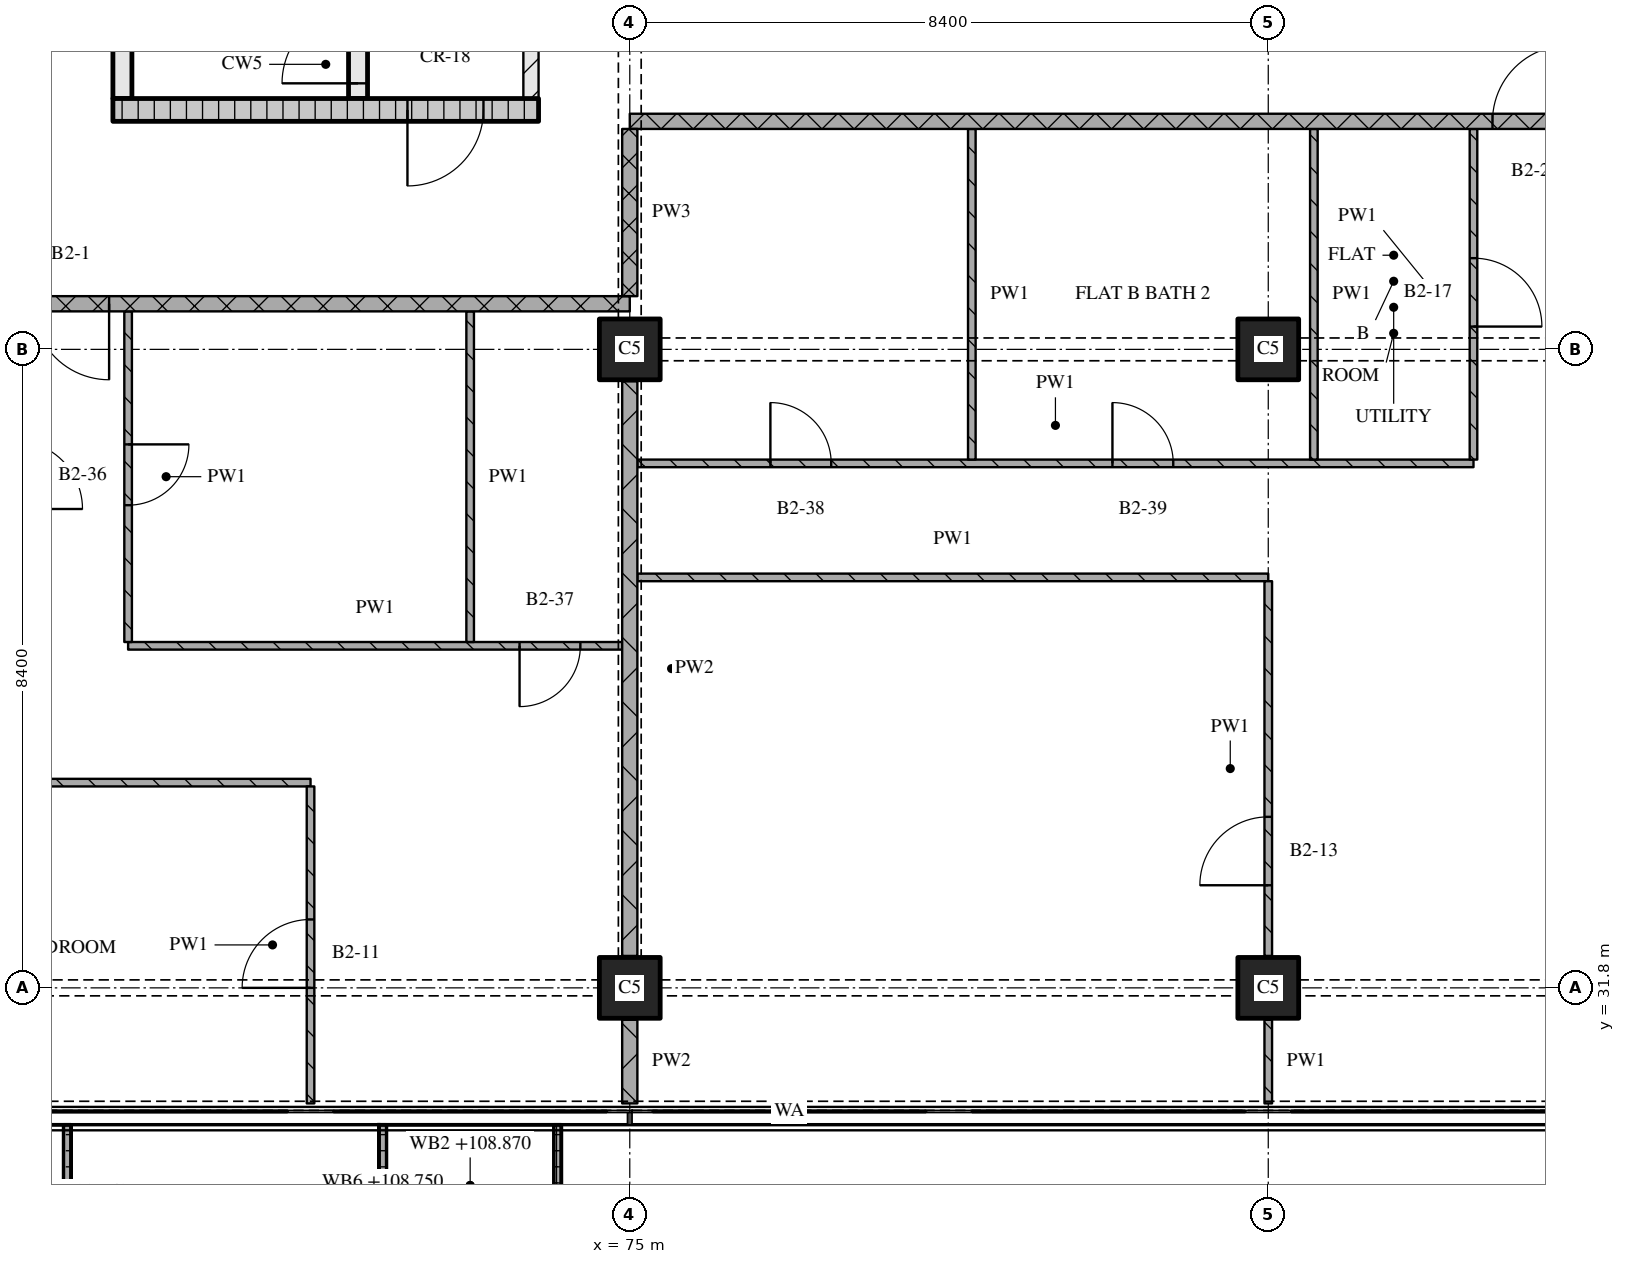
"""IFC4 building model, lengths in metres.
Left out: names, types, materials, properties, quantities, classifications, styles, units other than length and angle.
Written with IfcOpenShell. Run it as: python <this file> out.ifc"""

import sys

from ifc_helpers import new_model, si_unit, direction, frame, frame_2d, origin, origin_2d, place, context, subcontext, project, spatial, polyline, rectangle, outline, extrude, element, fill, save


model = new_model("IFC4")
c1 = context("Model", 3, precision=1e-05, world=origin(), true_north=direction((0.0, 1.0)))
c2 = subcontext(c1, "Body", "Model", "MODEL_VIEW")
j1 = project(units=[si_unit("LENGTHUNIT", "METRE"), si_unit("PLANEANGLEUNIT", "RADIAN")], contexts=[c1])
p1 = place(None, origin())
s1 = spatial("IfcSite", under=j1, at=p1, CompositionType="ELEMENT")
p2 = place(p1, origin())
s2 = spatial("IfcBuilding", under=s1, at=p2, CompositionType="ELEMENT")
p3 = place(p2, frame((0.0, 0.0, 106.05)))
s3 = spatial("IfcBuildingStorey", under=s2, at=p3, CompositionType="ELEMENT", Elevation=106.05)
for number, where, z_axis, x_axis in (
    (1, (75.0, 31.8, 0.0), (0.0, 0.0, 1.0), (1.0, 0.0, 0.0)),
    (2, (75.0, 40.2, 0.0), (0.0, 0.0, 1.0), (1.0, 0.0, 0.0)),
    (3, (83.4, 31.8, 0.0), (0.0, 0.0, 1.0), (1.0, 0.0, 0.0)),
    (4, (83.4, 40.2, 0.0), (0.0, 0.0, 1.0), (1.0, 0.0, 0.0)),
):
    element("IfcColumn", number, at=place(p3, frame(where, z_axis=z_axis, x_axis=x_axis)), inside=s3, PredefinedType="COLUMN", context=c2, shape_type="SweptSolid", body=[
        extrude(rectangle(XDim=0.8, YDim=0.8, at=origin_2d()), origin(), (0.0, 0.0, 1.0), 3.6),
    ])
p4 = place(p3, origin())
e5 = element("IfcWall", 5, at=p4, inside=s3, PredefinedType="SOLIDWALL", context=c2, shape_type="SweptSolid", body=[
    extrude(outline(polyline([(61.35, 30.0), (61.45, 30.0), (61.45, 28.233), (67.55, 28.233), (67.55, 30.0), (67.65, 30.0), (67.65, 28.133), (61.35, 28.133), (61.35, 30.0)])), origin(), (0.0, 0.0, 1.0), 1.0),
])
p5 = place(p3, origin())
e6 = element("IfcWall", 6, at=p5, inside=s3, PredefinedType="SOLIDWALL", context=c2, shape_type="SweptSolid", body=[
    extrude(outline(polyline([(71.7, 30.0), (71.8, 30.0), (71.8, 28.5), (74.0, 28.5), (74.0, 30.0), (74.1, 30.0), (74.1, 28.4), (71.7, 28.4), (71.7, 30.0)])), origin(), (0.0, 0.0, 1.0), 1.0),
])
p6 = place(p3, frame((68.2, 43.35, 0.0), z_axis=(0.0, 0.0, 1.0), x_axis=(1.0, 0.0, 0.0)))
e7 = element("IfcWall", 7, at=p6, inside=s3, PredefinedType="SOLIDWALL", context=c2, shape_type="SweptSolid", body=[
    extrude(rectangle(XDim=5.6, YDim=0.3, at=frame_2d((2.8, 0.0))), origin(), (0.0, 0.0, 1.0), 3.32),
])
p7 = place(p6, frame((3.875, 0.0, 0.0)))
e8 = element("IfcOpeningElement", 8, at=p7, cuts=e7, PredefinedType="OPENING", context=c2, shape_type="SweptSolid", body=[
    extrude(rectangle(XDim=1.0, YDim=2.1, at=frame_2d((0.5, 1.05))), frame((0.0, 0.16, 0.0), z_axis=(0.0, -1.0, 0.0), x_axis=(1.0, 0.0, 0.0)), (0.0, 0.0, 1.0), 0.32),
])
p8 = place(p3, frame((68.325, 43.5, 0.0), z_axis=(0.0, 0.0, 1.0), x_axis=(0.0, 1.0, 0.0)))
e9 = element("IfcWall", 9, at=p8, inside=s3, PredefinedType="SOLIDWALL", context=c2, shape_type="SweptSolid", body=[
    extrude(rectangle(XDim=6.9, YDim=0.25, at=frame_2d((3.45, 0.0))), origin(), (0.0, 0.0, 1.0), 3.32),
])
p9 = place(p3, frame((71.425, 43.5, 0.0), z_axis=(0.0, 0.0, 1.0), x_axis=(0.0, 1.0, 0.0)))
e10 = element("IfcWall", 10, at=p9, inside=s3, PredefinedType="SOLIDWALL", context=c2, shape_type="SweptSolid", body=[
    extrude(rectangle(XDim=6.9, YDim=0.25, at=frame_2d((3.45, 0.0))), origin(), (0.0, 0.0, 1.0), 3.32),
])
p10 = place(p9, frame((0.2, 0.0, 0.0)))
e11 = element("IfcOpeningElement", 11, at=p10, cuts=e10, PredefinedType="OPENING", context=c2, shape_type="SweptSolid", body=[
    extrude(rectangle(XDim=1.0, YDim=2.1, at=frame_2d((0.5, 1.05))), frame((0.0, 0.135, 0.0), z_axis=(0.0, -1.0, 0.0), x_axis=(1.0, 0.0, 0.0)), (0.0, 0.0, 1.0), 0.27),
])
p11 = place(p3, frame((73.7, 43.5, 0.0), z_axis=(0.0, 0.0, 1.0), x_axis=(0.0, 1.0, 0.0)))
e12 = element("IfcWall", 12, at=p11, inside=s3, PredefinedType="PARTITIONING", context=c2, shape_type="SweptSolid", body=[
    extrude(rectangle(XDim=6.9, YDim=0.2, at=frame_2d((3.45, 0.0))), origin(), (0.0, 0.0, 1.0), 3.32),
])
p12 = place(p11, frame((1.0, 0.0, 0.0)))
e13 = element("IfcOpeningElement", 13, at=p12, cuts=e12, PredefinedType="OPENING", context=c2, shape_type="SweptSolid", body=[
    extrude(rectangle(XDim=1.0, YDim=2.1, at=frame_2d((0.5, 1.05))), frame((0.0, 0.11, 0.0), z_axis=(0.0, -1.0, 0.0), x_axis=(1.0, 0.0, 0.0)), (0.0, 0.0, 1.0), 0.22),
])
p13 = place(p3, frame((70.8, 34.5, 0.0), z_axis=(0.0, 0.0, 1.0), x_axis=(-1.0, 0.0, 0.0)))
e14 = element("IfcWall", 14, at=p13, inside=s3, PredefinedType="PARTITIONING", context=c2, shape_type="SweptSolid", body=[
    extrude(rectangle(XDim=22.52, YDim=0.1, at=frame_2d((11.26, 0.0))), origin(), (0.0, 0.0, 1.0), 3.32),
])
p14 = place(p13, frame((10.05, 0.0, 0.0)))
e15 = element("IfcOpeningElement", 15, at=p14, cuts=e14, PredefinedType="OPENING", context=c2, shape_type="SweptSolid", body=[
    extrude(rectangle(XDim=0.9, YDim=2.1, at=frame_2d((0.45, 1.05))), frame((0.0, 0.06, 0.0), z_axis=(0.0, -1.0, 0.0), x_axis=(1.0, 0.0, 0.0)), (0.0, 0.0, 1.0), 0.12),
])
p15 = place(p13, frame((14.25, 0.0, 0.0)))
e16 = element("IfcOpeningElement", 16, at=p15, cuts=e14, PredefinedType="OPENING", context=c2, shape_type="SweptSolid", body=[
    extrude(rectangle(XDim=0.9, YDim=2.1, at=frame_2d((0.45, 1.05))), frame((0.0, 0.06, 0.0), z_axis=(0.0, -1.0, 0.0), x_axis=(1.0, 0.0, 0.0)), (0.0, 0.0, 1.0), 0.12),
])
p16 = place(p13, frame((17.654, 0.0, 0.0)))
e17 = element("IfcOpeningElement", 17, at=p16, cuts=e14, PredefinedType="OPENING", context=c2, shape_type="SweptSolid", body=[
    extrude(rectangle(XDim=0.9, YDim=2.1, at=frame_2d((0.45, 1.05))), frame((0.0, 0.06, 0.0), z_axis=(0.0, -1.0, 0.0), x_axis=(1.0, 0.0, 0.0)), (0.0, 0.0, 1.0), 0.12),
])
p17 = place(p3, frame((68.4, 36.3, 0.0), z_axis=(0.0, 0.0, 1.0), x_axis=(1.0, 0.0, 0.0)))
e18 = element("IfcWall", 18, at=p17, inside=s3, PredefinedType="PARTITIONING", context=c2, shape_type="SweptSolid", body=[
    extrude(rectangle(XDim=6.5, YDim=0.1, at=frame_2d((3.25, 0.0))), origin(), (0.0, 0.0, 1.0), 3.32),
])
p18 = place(p17, frame((5.15, 0.0, 0.0)))
e19 = element("IfcOpeningElement", 19, at=p18, cuts=e18, PredefinedType="OPENING", context=c2, shape_type="SweptSolid", body=[
    extrude(rectangle(XDim=0.8, YDim=2.1, at=frame_2d((0.4, 1.05))), frame((0.0, 0.06, 0.0), z_axis=(0.0, -1.0, 0.0), x_axis=(1.0, 0.0, 0.0)), (0.0, 0.0, 1.0), 0.12),
])
p19 = place(p3, frame((75.1, 37.2, 0.0), z_axis=(0.0, 0.0, 1.0), x_axis=(1.0, 0.0, 0.0)))
e20 = element("IfcWall", 20, at=p19, inside=s3, PredefinedType="PARTITIONING", context=c2, shape_type="SweptSolid", body=[
    extrude(rectangle(XDim=8.3, YDim=0.1, at=frame_2d((4.15, 0.0))), origin(), (0.0, 0.0, 1.0), 3.32),
])
p20 = place(p3, frame((75.1, 38.7, 0.0), z_axis=(0.0, 0.0, 1.0), x_axis=(1.0, 0.0, 0.0)))
e21 = element("IfcWall", 21, at=p20, inside=s3, PredefinedType="PARTITIONING", context=c2, shape_type="SweptSolid", body=[
    extrude(rectangle(XDim=11.0, YDim=0.1, at=frame_2d((5.5, 0.0))), origin(), (0.0, 0.0, 1.0), 3.32),
])
p21 = place(p20, frame((1.75, 0.0, 0.0)))
e22 = element("IfcOpeningElement", 22, at=p21, cuts=e21, PredefinedType="OPENING", context=c2, shape_type="SweptSolid", body=[
    extrude(rectangle(XDim=0.8, YDim=2.1, at=frame_2d((0.4, 1.05))), frame((0.0, 0.06, 0.0), z_axis=(0.0, -1.0, 0.0), x_axis=(1.0, 0.0, 0.0)), (0.0, 0.0, 1.0), 0.12),
])
p22 = place(p20, frame((6.25, 0.0, 0.0)))
e23 = element("IfcOpeningElement", 23, at=p22, cuts=e21, PredefinedType="OPENING", context=c2, shape_type="SweptSolid", body=[
    extrude(rectangle(XDim=0.8, YDim=2.1, at=frame_2d((0.4, 1.05))), frame((0.0, 0.06, 0.0), z_axis=(0.0, -1.0, 0.0), x_axis=(1.0, 0.0, 0.0)), (0.0, 0.0, 1.0), 0.12),
])
p23 = place(p3, frame((75.0, 40.8, 0.0), z_axis=(0.0, 0.0, 1.0), x_axis=(-1.0, 0.0, 0.0)))
e24 = element("IfcWall", 24, at=p23, inside=s3, PredefinedType="PARTITIONING", context=c2, shape_type="SweptSolid", body=[
    extrude(rectangle(XDim=24.18, YDim=0.2, at=frame_2d((12.09, 0.0))), origin(), (0.0, 0.0, 1.0), 3.32),
])
p24 = place(p23, frame((6.85, 0.0, 0.0)))
e25 = element("IfcOpeningElement", 25, at=p24, cuts=e24, PredefinedType="OPENING", context=c2, shape_type="SweptSolid", body=[
    extrude(rectangle(XDim=1.0, YDim=2.1, at=frame_2d((0.5, 1.05))), frame((0.0, 0.11, 0.0), z_axis=(0.0, -1.0, 0.0), x_axis=(1.0, 0.0, 0.0)), (0.0, 0.0, 1.0), 0.22),
])
p25 = place(p3, frame((100.2, 43.2, 0.0), z_axis=(0.0, 0.0, 1.0), x_axis=(-1.0, 0.0, 0.0)))
e26 = element("IfcWall", 26, at=p25, inside=s3, PredefinedType="PARTITIONING", context=c2, shape_type="SweptSolid", body=[
    extrude(rectangle(XDim=25.2, YDim=0.2, at=frame_2d((12.6, 0.0))), origin(), (0.0, 0.0, 1.0), 3.32),
])
p26 = place(p25, frame((12.85, 0.0, 0.0)))
e27 = element("IfcOpeningElement", 27, at=p26, cuts=e26, PredefinedType="OPENING", context=c2, shape_type="SweptSolid", body=[
    extrude(rectangle(XDim=1.0, YDim=2.1, at=frame_2d((0.5, 1.05))), frame((0.0, 0.11, 0.0), z_axis=(0.0, -1.0, 0.0), x_axis=(1.0, 0.0, 0.0)), (0.0, 0.0, 1.0), 0.22),
])
p27 = place(p3, frame((68.4, 40.7, 0.0), z_axis=(0.0, 0.0, 1.0), x_axis=(0.0, -1.0, 0.0)))
e28 = element("IfcWall", 28, at=p27, inside=s3, PredefinedType="PARTITIONING", context=c2, shape_type="SweptSolid", body=[
    extrude(rectangle(XDim=4.35, YDim=0.1, at=frame_2d((2.175, 0.0))), origin(), (0.0, 0.0, 1.0), 3.32),
])
p28 = place(p27, frame((1.75, 0.0, 0.0)))
e29 = element("IfcOpeningElement", 29, at=p28, cuts=e28, PredefinedType="OPENING", context=c2, shape_type="SweptSolid", body=[
    extrude(rectangle(XDim=0.8, YDim=2.1, at=frame_2d((0.4, 1.05))), frame((0.0, 0.06, 0.0), z_axis=(0.0, -1.0, 0.0), x_axis=(1.0, 0.0, 0.0)), (0.0, 0.0, 1.0), 0.12),
])
p29 = place(p3, frame((70.8, 30.28, 0.0), z_axis=(0.0, 0.0, 1.0), x_axis=(0.0, 1.0, 0.0)))
e30 = element("IfcWall", 30, at=p29, inside=s3, PredefinedType="PARTITIONING", context=c2, shape_type="SweptSolid", body=[
    extrude(rectangle(XDim=4.17, YDim=0.1, at=frame_2d((2.085, 0.0))), origin(), (0.0, 0.0, 1.0), 3.32),
])
p30 = place(p29, frame((1.52, 0.0, 0.0)))
e31 = element("IfcOpeningElement", 31, at=p30, cuts=e30, PredefinedType="OPENING", context=c2, shape_type="SweptSolid", body=[
    extrude(rectangle(XDim=0.9, YDim=2.1, at=frame_2d((0.45, 1.05))), frame((0.0, 0.06, 0.0), z_axis=(0.0, -1.0, 0.0), x_axis=(1.0, 0.0, 0.0)), (0.0, 0.0, 1.0), 0.12),
])
p31 = place(p3, frame((72.9, 40.7, 0.0), z_axis=(0.0, 0.0, 1.0), x_axis=(0.0, -1.0, 0.0)))
e32 = element("IfcWall", 32, at=p31, inside=s3, PredefinedType="PARTITIONING", context=c2, shape_type="SweptSolid", body=[
    extrude(rectangle(XDim=4.35, YDim=0.1, at=frame_2d((2.175, 0.0))), origin(), (0.0, 0.0, 1.0), 3.32),
])
p32 = place(p3, frame((75.0, 43.1, 0.0), z_axis=(0.0, 0.0, 1.0), x_axis=(0.0, -1.0, 0.0)))
e33 = element("IfcWall", 33, at=p32, inside=s3, PredefinedType="PARTITIONING", context=c2, shape_type="SweptSolid", body=[
    extrude(rectangle(XDim=2.2, YDim=0.2, at=frame_2d((1.1, 0.0))), origin(), (0.0, 0.0, 1.0), 2.43),
])
p33 = place(p3, frame((75.0, 31.38, 0.0), z_axis=(0.0, 0.0, 1.0), x_axis=(0.0, -1.0, 0.0)))
e34 = element("IfcWall", 34, at=p33, inside=s3, PredefinedType="PARTITIONING", context=c2, shape_type="SweptSolid", body=[
    extrude(rectangle(XDim=1.1, YDim=0.2, at=frame_2d((0.55, 0.0))), origin(), (0.0, 0.0, 1.0), 3.32),
])
p34 = place(p3, frame((75.0, 39.78, 0.0), z_axis=(0.0, 0.0, 1.0), x_axis=(0.0, -1.0, 0.0)))
e35 = element("IfcWall", 35, at=p34, inside=s3, PredefinedType="PARTITIONING", context=c2, shape_type="SweptSolid", body=[
    extrude(rectangle(XDim=7.56, YDim=0.2, at=frame_2d((3.78, 0.0))), origin(), (0.0, 0.0, 1.0), 2.83),
])
p35 = place(p3, frame((79.5, 43.1, 0.0), z_axis=(0.0, 0.0, 1.0), x_axis=(0.0, -1.0, 0.0)))
e36 = element("IfcWall", 36, at=p35, inside=s3, PredefinedType="PARTITIONING", context=c2, shape_type="SweptSolid", body=[
    extrude(rectangle(XDim=4.35, YDim=0.1, at=frame_2d((2.175, 0.0))), origin(), (0.0, 0.0, 1.0), 3.32),
])
p36 = place(p3, frame((83.4, 31.38, 0.0), z_axis=(0.0, 0.0, 1.0), x_axis=(0.0, -1.0, 0.0)))
e37 = element("IfcWall", 37, at=p36, inside=s3, PredefinedType="PARTITIONING", context=c2, shape_type="SweptSolid", body=[
    extrude(rectangle(XDim=1.1, YDim=0.1, at=frame_2d((0.55, 0.0))), origin(), (0.0, 0.0, 1.0), 3.32),
])
p37 = place(p3, frame((83.4, 32.22, 0.0), z_axis=(0.0, 0.0, 1.0), x_axis=(0.0, 1.0, 0.0)))
e38 = element("IfcWall", 38, at=p37, inside=s3, PredefinedType="PARTITIONING", context=c2, shape_type="SweptSolid", body=[
    extrude(rectangle(XDim=4.93, YDim=0.1, at=frame_2d((2.465, 0.0))), origin(), (0.0, 0.0, 1.0), 3.32),
])
p38 = place(p37, frame((0.93, 0.0, 0.0)))
e39 = element("IfcOpeningElement", 39, at=p38, cuts=e38, PredefinedType="OPENING", context=c2, shape_type="SweptSolid", body=[
    extrude(rectangle(XDim=0.9, YDim=2.1, at=frame_2d((0.45, 1.05))), frame((0.0, 0.06, 0.0), z_axis=(0.0, -1.0, 0.0), x_axis=(1.0, 0.0, 0.0)), (0.0, 0.0, 1.0), 0.12),
])
p39 = place(p3, frame((84.0, 43.1, 0.0), z_axis=(0.0, 0.0, 1.0), x_axis=(0.0, -1.0, 0.0)))
e40 = element("IfcWall", 40, at=p39, inside=s3, PredefinedType="PARTITIONING", context=c2, shape_type="SweptSolid", body=[
    extrude(rectangle(XDim=4.35, YDim=0.1, at=frame_2d((2.175, 0.0))), origin(), (0.0, 0.0, 1.0), 3.32),
])
p40 = place(p3, frame((86.1, 38.75, 0.0), z_axis=(0.0, 0.0, 1.0), x_axis=(0.0, 1.0, 0.0)))
e41 = element("IfcWall", 41, at=p40, inside=s3, PredefinedType="PARTITIONING", context=c2, shape_type="SweptSolid", body=[
    extrude(rectangle(XDim=4.35, YDim=0.1, at=frame_2d((2.175, 0.0))), origin(), (0.0, 0.0, 1.0), 3.32),
])
p41 = place(p40, frame((1.75, 0.0, 0.0)))
e42 = element("IfcOpeningElement", 42, at=p41, cuts=e41, PredefinedType="OPENING", context=c2, shape_type="SweptSolid", body=[
    extrude(rectangle(XDim=0.9, YDim=2.1, at=frame_2d((0.45, 1.05))), frame((0.0, 0.06, 0.0), z_axis=(0.0, -1.0, 0.0), x_axis=(1.0, 0.0, 0.0)), (0.0, 0.0, 1.0), 0.12),
])
p42 = place(p7, origin())
e43 = element("IfcDoor", 43, at=p42, inside=s3, OperationType="SINGLE_SWING_RIGHT", PredefinedType="DOOR", context=c2, shape_type="SweptSolid", body=[
    extrude(rectangle(XDim=1.0, YDim=2.1, at=frame_2d((0.5, 1.05))), frame((0.0, 0.025, 0.0), z_axis=(0.0, -1.0, 0.0), x_axis=(1.0, 0.0, 0.0)), (0.0, 0.0, 1.0), 0.05),
])
fill(e8, e43)
p43 = place(p10, origin())
e44 = element("IfcDoor", 44, at=p43, inside=s3, OperationType="SINGLE_SWING_LEFT", PredefinedType="DOOR", context=c2, shape_type="SweptSolid", body=[
    extrude(rectangle(XDim=1.0, YDim=2.1, at=frame_2d((0.5, 1.05))), frame((0.0, 0.025, 0.0), z_axis=(0.0, -1.0, 0.0), x_axis=(1.0, 0.0, 0.0)), (0.0, 0.0, 1.0), 0.05),
])
fill(e11, e44)
p44 = place(p18, origin())
e45 = element("IfcDoor", 45, at=p44, inside=s3, OperationType="SINGLE_SWING_RIGHT", PredefinedType="DOOR", context=c2, shape_type="SweptSolid", body=[
    extrude(rectangle(XDim=0.8, YDim=2.1, at=frame_2d((0.4, 1.05))), frame((0.0, 0.025, 0.0), z_axis=(0.0, -1.0, 0.0), x_axis=(1.0, 0.0, 0.0)), (0.0, 0.0, 1.0), 0.05),
])
fill(e19, e45)
p45 = place(p21, origin())
e46 = element("IfcDoor", 46, at=p45, inside=s3, OperationType="SINGLE_SWING_LEFT", PredefinedType="DOOR", context=c2, shape_type="SweptSolid", body=[
    extrude(rectangle(XDim=0.8, YDim=2.1, at=frame_2d((0.4, 1.05))), frame((0.0, 0.025, 0.0), z_axis=(0.0, -1.0, 0.0), x_axis=(1.0, 0.0, 0.0)), (0.0, 0.0, 1.0), 0.05),
])
fill(e22, e46)
p46 = place(p22, origin())
e47 = element("IfcDoor", 47, at=p46, inside=s3, OperationType="SINGLE_SWING_LEFT", PredefinedType="DOOR", context=c2, shape_type="SweptSolid", body=[
    extrude(rectangle(XDim=0.8, YDim=2.1, at=frame_2d((0.4, 1.05))), frame((0.0, 0.025, 0.0), z_axis=(0.0, -1.0, 0.0), x_axis=(1.0, 0.0, 0.0)), (0.0, 0.0, 1.0), 0.05),
])
fill(e23, e47)
p47 = place(p24, origin())
e48 = element("IfcDoor", 48, at=p47, inside=s3, OperationType="SINGLE_SWING_LEFT", PredefinedType="DOOR", context=c2, shape_type="SweptSolid", body=[
    extrude(rectangle(XDim=1.0, YDim=2.1, at=frame_2d((0.5, 1.05))), frame((0.0, 0.025, 0.0), z_axis=(0.0, -1.0, 0.0), x_axis=(1.0, 0.0, 0.0)), (0.0, 0.0, 1.0), 0.05),
])
fill(e25, e48)
p48 = place(p26, origin())
e49 = element("IfcDoor", 49, at=p48, inside=s3, OperationType="SINGLE_SWING_RIGHT", PredefinedType="DOOR", context=c2, shape_type="SweptSolid", body=[
    extrude(rectangle(XDim=1.0, YDim=2.1, at=frame_2d((0.5, 1.05))), frame((0.0, 0.025, 0.0), z_axis=(0.0, -1.0, 0.0), x_axis=(1.0, 0.0, 0.0)), (0.0, 0.0, 1.0), 0.05),
])
fill(e27, e49)
p49 = place(p28, origin())
e50 = element("IfcDoor", 50, at=p49, inside=s3, OperationType="SINGLE_SWING_LEFT", PredefinedType="DOOR", context=c2, shape_type="SweptSolid", body=[
    extrude(rectangle(XDim=0.8, YDim=2.1, at=frame_2d((0.4, 1.05))), frame((0.0, 0.025, 0.0), z_axis=(0.0, -1.0, 0.0), x_axis=(1.0, 0.0, 0.0)), (0.0, 0.0, 1.0), 0.05),
])
fill(e29, e50)
p50 = place(p30, origin())
e51 = element("IfcDoor", 51, at=p50, inside=s3, OperationType="SINGLE_SWING_LEFT", PredefinedType="DOOR", context=c2, shape_type="SweptSolid", body=[
    extrude(rectangle(XDim=0.9, YDim=2.1, at=frame_2d((0.45, 1.05))), frame((0.0, 0.025, 0.0), z_axis=(0.0, -1.0, 0.0), x_axis=(1.0, 0.0, 0.0)), (0.0, 0.0, 1.0), 0.05),
])
fill(e31, e51)
p51 = place(p38, origin())
e52 = element("IfcDoor", 52, at=p51, inside=s3, OperationType="SINGLE_SWING_LEFT", PredefinedType="DOOR", context=c2, shape_type="SweptSolid", body=[
    extrude(rectangle(XDim=0.9, YDim=2.1, at=frame_2d((0.45, 1.05))), frame((0.0, 0.025, 0.0), z_axis=(0.0, -1.0, 0.0), x_axis=(1.0, 0.0, 0.0)), (0.0, 0.0, 1.0), 0.05),
])
fill(e39, e52)
p52 = place(p41, origin())
e53 = element("IfcDoor", 53, at=p52, inside=s3, OperationType="SINGLE_SWING_RIGHT", PredefinedType="DOOR", context=c2, shape_type="SweptSolid", body=[
    extrude(rectangle(XDim=0.9, YDim=2.1, at=frame_2d((0.45, 1.05))), frame((0.0, 0.025, 0.0), z_axis=(0.0, -1.0, 0.0), x_axis=(1.0, 0.0, 0.0)), (0.0, 0.0, 1.0), 0.05),
])
fill(e42, e53)
save(model, sys.argv[1])
